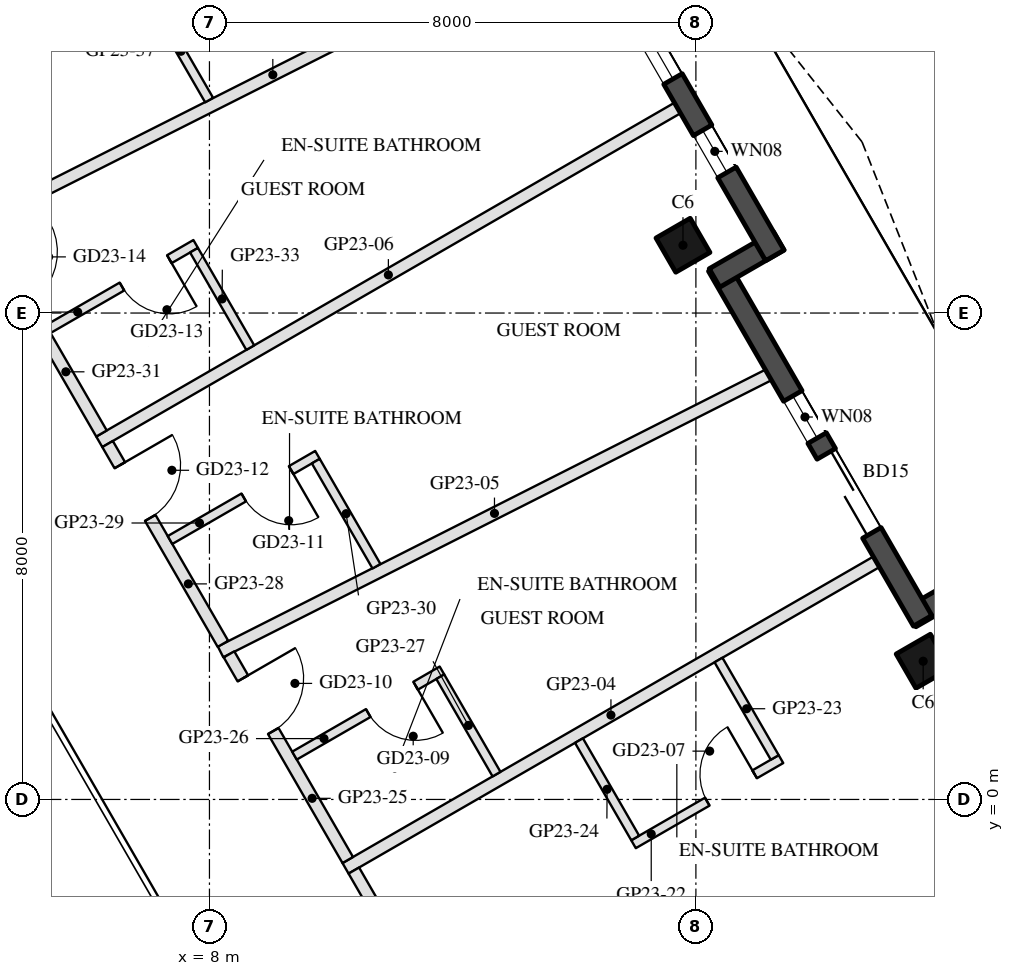
"""IFC4 building model, lengths in metres.
Left out: names, types, materials, properties, quantities, classifications, styles, units other than length and angle.
Written with IfcOpenShell. Run it as: python <this file> out.ifc"""

import sys

from ifc_helpers import new_model, si_unit, direction, frame, frame_2d, origin, origin_2d, place, context, subcontext, project, spatial, rectangle, hollow_rectangle, extrude, element, fill, save


model = new_model("IFC4")
c1 = context("Model", 3, precision=1e-05, world=origin(), true_north=direction((0.0, 1.0)))
c2 = subcontext(c1, "Body", "Model", "MODEL_VIEW")
j1 = project(units=[si_unit("LENGTHUNIT", "METRE"), si_unit("PLANEANGLEUNIT", "RADIAN")], contexts=[c1])
p1 = place(None, origin())
s1 = spatial("IfcSite", under=j1, at=p1, CompositionType="ELEMENT")
p2 = place(p1, origin())
s2 = spatial("IfcBuilding", under=s1, at=p2, CompositionType="ELEMENT")
p3 = place(p2, frame((0.0, 0.0, 246.7)))
s3 = spatial("IfcBuildingStorey", under=s2, at=p3, CompositionType="ELEMENT", Elevation=246.7)
for number, where, z_axis, x_axis in (
    (1, (19.738, 2.273, 0.0), (0.0, 0.0, 1.0), (-0.5, 0.866, 0.0)),
    (2, (15.788, 9.115, 0.0), (0.0, 0.0, 1.0), (-0.5, 0.866, 0.0)),
):
    element("IfcColumn", number, at=place(p3, frame(where, z_axis=z_axis, x_axis=x_axis)), inside=s3, PredefinedType="COLUMN", context=c2, shape_type="SweptSolid", body=[
        extrude(hollow_rectangle(XDim=0.65, YDim=0.65, WallThickness=0.03, at=origin_2d()), origin(), (0.0, 0.0, 1.0), 3.7),
    ])
p4 = place(p3, frame((20.588, 3.601, 0.0), z_axis=(0.0, 0.0, 1.0), x_axis=(-0.866005645448, -0.500034220881, 0.0)))
e3 = element("IfcWall", 3, at=p4, inside=s3, PredefinedType="SOLIDWALL", context=c2, shape_type="SweptSolid", body=[
    extrude(rectangle(XDim=1.22, YDim=0.35, at=frame_2d((0.61, 0.0))), origin(), (0.0, 0.0, 1.0), 3.55),
])
p5 = place(p3, frame((19.729, 2.938, 0.0), z_axis=(0.0, 0.0, 1.0), x_axis=(-0.499976430342, 0.866039011305, 0.0)))
e4 = element("IfcWall", 4, at=p5, inside=s3, PredefinedType="SOLIDWALL", context=c2, shape_type="SweptSolid", body=[
    extrude(rectangle(XDim=6.74, YDim=0.35, at=frame_2d((3.37, 0.0))), origin(), (0.0, 0.0, 1.0), 3.55),
])
p6 = place(p5, frame((1.67, 0.0, 0.0)))
e5 = element("IfcOpeningElement", 5, at=p6, cuts=e4, PredefinedType="OPENING", context=c2, shape_type="SweptSolid", body=[
    extrude(rectangle(XDim=1.5, YDim=2.4, at=frame_2d((0.75, 1.2))), frame((0.0, 0.185, 0.0), z_axis=(0.0, -1.0, 0.0), x_axis=(1.0, 0.0, 0.0)), (0.0, 0.0, 1.0), 0.37),
])
p7 = place(p5, frame((3.47, 0.0, 0.3)))
e6 = element("IfcOpeningElement", 6, at=p7, cuts=e4, PredefinedType="OPENING", context=c2, shape_type="SweptSolid", body=[
    extrude(rectangle(XDim=0.8, YDim=2.65, at=frame_2d((0.4, 1.325))), frame((0.0, 0.185, 0.0), z_axis=(0.0, -1.0, 0.0), x_axis=(1.0, 0.0, 0.0)), (0.0, 0.0, 1.0), 0.37),
])
p8 = place(p3, frame((16.306, 8.577, 0.0), z_axis=(0.0, 0.0, 1.0), x_axis=(0.866092288191, 0.499884134912, 0.0)))
e7 = element("IfcWall", 7, at=p8, inside=s3, PredefinedType="SOLIDWALL", context=c2, shape_type="SweptSolid", body=[
    extrude(rectangle(XDim=1.22, YDim=0.35, at=frame_2d((0.61, 0.0))), origin(), (0.0, 0.0, 1.0), 3.55),
])
p9 = place(p3, frame((17.299, 8.948, 0.0), z_axis=(0.0, 0.0, 1.0), x_axis=(-0.500010041276, 0.866019606374, 0.0)))
e8 = element("IfcWall", 8, at=p9, inside=s3, PredefinedType="SOLIDWALL", context=c2, shape_type="SweptSolid", body=[
    extrude(rectangle(XDim=9.7, YDim=0.35, at=frame_2d((4.85, 0.0))), origin(), (0.0, 0.0, 1.0), 3.55),
])
p10 = place(p9, frame((1.575, 0.0, 0.3)))
e9 = element("IfcOpeningElement", 9, at=p10, cuts=e8, PredefinedType="OPENING", context=c2, shape_type="SweptSolid", body=[
    extrude(rectangle(XDim=0.8, YDim=2.65, at=frame_2d((0.4, 1.325))), frame((0.0, 0.185, 0.0), z_axis=(0.0, -1.0, 0.0), x_axis=(1.0, 0.0, 0.0)), (0.0, 0.0, 1.0), 0.37),
])
p11 = place(p9, frame((3.351, 0.0, 0.3)))
e10 = element("IfcOpeningElement", 10, at=p11, cuts=e8, PredefinedType="OPENING", context=c2, shape_type="SweptSolid", body=[
    extrude(rectangle(XDim=0.8, YDim=2.65, at=frame_2d((0.4, 1.325))), frame((0.0, 0.185, 0.0), z_axis=(0.0, -1.0, 0.0), x_axis=(1.0, 0.0, 0.0)), (0.0, 0.0, 1.0), 0.37),
])
p12 = place(p9, frame((4.949, 0.0, 0.3)))
e11 = element("IfcOpeningElement", 11, at=p12, cuts=e8, PredefinedType="OPENING", context=c2, shape_type="SweptSolid", body=[
    extrude(rectangle(XDim=0.9, YDim=2.65, at=frame_2d((0.45, 1.325))), frame((0.0, 0.185, 0.0), z_axis=(0.0, -1.0, 0.0), x_axis=(1.0, 0.0, 0.0)), (0.0, 0.0, 1.0), 0.37),
])
p13 = place(p9, frame((6.84, 0.0, 0.3)))
e12 = element("IfcOpeningElement", 12, at=p13, cuts=e8, PredefinedType="OPENING", context=c2, shape_type="SweptSolid", body=[
    extrude(rectangle(XDim=1.2, YDim=2.65, at=frame_2d((0.6, 1.325))), frame((0.0, 0.185, 0.0), z_axis=(0.0, -1.0, 0.0), x_axis=(1.0, 0.0, 0.0)), (0.0, 0.0, 1.0), 0.37),
])
p14 = place(p3, frame((18.968, 3.907, 0.0), z_axis=(0.0, 0.0, 1.0), x_axis=(-0.866022637375, -0.500004791531, 0.0)))
e13 = element("IfcWall", 13, at=p14, inside=s3, PredefinedType="PARTITIONING", context=c2, shape_type="SweptSolid", body=[
    extrude(rectangle(XDim=10.08, YDim=0.2, at=frame_2d((5.04, 0.0))), origin(), (0.0, 0.0, 1.0), 3.16),
])
p15 = place(p3, frame((17.192, 6.982, 0.0), z_axis=(0.0, 0.0, 1.0), x_axis=(-0.892469554868, -0.451107629766, 0.0)))
e14 = element("IfcWall", 14, at=p15, inside=s3, PredefinedType="PARTITIONING", context=c2, shape_type="SweptSolid", body=[
    extrude(rectangle(XDim=10.096, YDim=0.2, at=frame_2d((5.048, 0.0))), origin(), (0.0, 0.0, 1.0), 3.16),
])
p16 = place(p3, frame((15.697, 11.372, 0.0), z_axis=(0.0, 0.0, 1.0), x_axis=(-0.866027479907, -0.499996404033, 0.0)))
e15 = element("IfcWall", 15, at=p16, inside=s3, PredefinedType="PARTITIONING", context=c2, shape_type="SweptSolid", body=[
    extrude(rectangle(XDim=10.98, YDim=0.2, at=frame_2d((5.49, 0.0))), origin(), (0.0, 0.0, 1.0), 3.16),
])
p17 = place(p3, frame((13.952, 14.395, 0.0), z_axis=(0.0, 0.0, 1.0), x_axis=(-0.892890171934, -0.450274517226, 0.0)))
e16 = element("IfcWall", 16, at=p17, inside=s3, PredefinedType="PARTITIONING", context=c2, shape_type="SweptSolid", body=[
    extrude(rectangle(XDim=10.998, YDim=0.2, at=frame_2d((5.499, 0.0))), origin(), (0.0, 0.0, 1.0), 3.16),
])
p18 = place(p3, frame((10.375, -1.169, 0.0), z_axis=(0.0, 0.0, 1.0), x_axis=(0.500055316652, -0.865993464345, 0.0)))
e17 = element("IfcWall", 17, at=p18, inside=s3, PredefinedType="PARTITIONING", context=c2, shape_type="SweptSolid", body=[
    extrude(rectangle(XDim=3.788, YDim=0.2, at=frame_2d((1.894, 0.0))), origin(), (0.0, 0.0, 1.0), 2.95),
])
p19 = place(p18, frame((1.394, 0.0, 0.0)))
e18 = element("IfcOpeningElement", 18, at=p19, cuts=e17, PredefinedType="OPENING", context=c2, shape_type="SweptSolid", body=[
    extrude(rectangle(XDim=1.0, YDim=2.1, at=frame_2d((0.5, 1.05))), frame((0.0, 0.11, 0.0), z_axis=(0.0, -1.0, 0.0), x_axis=(1.0, 0.0, 0.0)), (0.0, 0.0, 1.0), 0.22),
])
p20 = place(p3, frame((14.974, -0.737, 0.0), z_axis=(0.0, 0.0, 1.0), x_axis=(0.866018616679, 0.500011755427, 0.0)))
e19 = element("IfcWall", 19, at=p20, inside=s3, PredefinedType="PARTITIONING", context=c2, shape_type="SweptSolid", body=[
    extrude(rectangle(XDim=2.8, YDim=0.15, at=frame_2d((1.4, 0.0))), origin(), (0.0, 0.0, 1.0), 3.55),
])
p21 = place(p20, frame((1.4, 0.0, 0.0)))
e20 = element("IfcOpeningElement", 20, at=p21, cuts=e19, PredefinedType="OPENING", context=c2, shape_type="SweptSolid", body=[
    extrude(rectangle(XDim=0.9, YDim=2.1, at=frame_2d((0.45, 1.05))), frame((0.0, 0.085, 0.0), z_axis=(0.0, -1.0, 0.0), x_axis=(1.0, 0.0, 0.0)), (0.0, 0.0, 1.0), 0.17),
])
p22 = place(p3, frame((17.297, 0.691, 0.0), z_axis=(0.0, 0.0, 1.0), x_axis=(-0.499985172903, 0.866033964044, 0.0)))
e21 = element("IfcWall", 21, at=p22, inside=s3, PredefinedType="PARTITIONING", context=c2, shape_type="SweptSolid", body=[
    extrude(rectangle(XDim=1.85, YDim=0.15, at=frame_2d((0.925, 0.0))), origin(), (0.0, 0.0, 1.0), 2.95),
])
p23 = place(p3, frame((15.002, -0.634, 0.0), z_axis=(0.0, 0.0, 1.0), x_axis=(-0.500042316284, 0.866000971088, 0.0)))
e22 = element("IfcWall", 22, at=p23, inside=s3, PredefinedType="PARTITIONING", context=c2, shape_type="SweptSolid", body=[
    extrude(rectangle(XDim=1.85, YDim=0.15, at=frame_2d((0.925, 0.0))), origin(), (0.0, 0.0, 1.0), 2.95),
])
p24 = place(p3, frame((8.322, 2.386, 0.0), z_axis=(0.0, 0.0, 1.0), x_axis=(0.499998439657, -0.866026304647, 0.0)))
e23 = element("IfcWall", 23, at=p24, inside=s3, PredefinedType="PARTITIONING", context=c2, shape_type="SweptSolid", body=[
    extrude(rectangle(XDim=3.905, YDim=0.2, at=frame_2d((1.953, 0.0))), origin(), (0.0, 0.0, 1.0), 2.95),
])
p25 = place(p24, frame((0.455, 0.0, 0.0)))
e24 = element("IfcOpeningElement", 24, at=p25, cuts=e23, PredefinedType="OPENING", context=c2, shape_type="SweptSolid", body=[
    extrude(rectangle(XDim=1.0, YDim=2.1, at=frame_2d((0.5, 1.05))), frame((0.0, 0.11, 0.0), z_axis=(0.0, -1.0, 0.0), x_axis=(1.0, 0.0, 0.0)), (0.0, 0.0, 1.0), 0.22),
])
p26 = place(p3, frame((11.823, 2.121, 0.0), z_axis=(0.0, 0.0, 1.0), x_axis=(-0.866034573852, -0.49998411664, 0.0)))
e25 = element("IfcWall", 25, at=p26, inside=s3, PredefinedType="PARTITIONING", context=c2, shape_type="SweptSolid", body=[
    extrude(rectangle(XDim=2.8, YDim=0.15, at=frame_2d((1.4, 0.0))), origin(), (0.0, 0.0, 1.0), 2.95),
])
p27 = place(p26, frame((0.5, 0.0, 0.0)))
e26 = element("IfcOpeningElement", 26, at=p27, cuts=e25, PredefinedType="OPENING", context=c2, shape_type="SweptSolid", body=[
    extrude(rectangle(XDim=0.9, YDim=2.1, at=frame_2d((0.45, 1.05))), frame((0.0, 0.085, 0.0), z_axis=(0.0, -1.0, 0.0), x_axis=(1.0, 0.0, 0.0)), (0.0, 0.0, 1.0), 0.17),
])
p28 = place(p3, frame((12.721, 0.416, 0.0), z_axis=(0.0, 0.0, 1.0), x_axis=(-0.499985172903, 0.866033964044, 0.0)))
e27 = element("IfcWall", 27, at=p28, inside=s3, PredefinedType="PARTITIONING", context=c2, shape_type="SweptSolid", body=[
    extrude(rectangle(XDim=1.85, YDim=0.15, at=frame_2d((0.925, 0.0))), origin(), (0.0, 0.0, 1.0), 3.55),
])
p29 = place(p3, frame((6.325, 5.845, 0.0), z_axis=(0.0, 0.0, 1.0), x_axis=(0.499973105789, -0.866040930607, 0.0)))
e28 = element("IfcWall", 28, at=p29, inside=s3, PredefinedType="PARTITIONING", context=c2, shape_type="SweptSolid", body=[
    extrude(rectangle(XDim=3.794, YDim=0.2, at=frame_2d((1.897, 0.0))), origin(), (0.0, 0.0, 1.0), 2.95),
])
p30 = place(p29, frame((0.403, 0.0, 0.0)))
e29 = element("IfcOpeningElement", 29, at=p30, cuts=e28, PredefinedType="OPENING", context=c2, shape_type="SweptSolid", body=[
    extrude(rectangle(XDim=1.0, YDim=2.1, at=frame_2d((0.5, 1.05))), frame((0.0, 0.11, 0.0), z_axis=(0.0, -1.0, 0.0), x_axis=(1.0, 0.0, 0.0)), (0.0, 0.0, 1.0), 0.22),
])
p31 = place(p3, frame((9.776, 5.667, 0.0), z_axis=(0.0, 0.0, 1.0), x_axis=(-0.866034573852, -0.49998411664, 0.0)))
e30 = element("IfcWall", 30, at=p31, inside=s3, PredefinedType="PARTITIONING", context=c2, shape_type="SweptSolid", body=[
    extrude(rectangle(XDim=2.8, YDim=0.15, at=frame_2d((1.4, 0.0))), origin(), (0.0, 0.0, 1.0), 2.95),
])
p32 = place(p31, frame((0.5, 0.0, 0.0)))
e31 = element("IfcOpeningElement", 31, at=p32, cuts=e30, PredefinedType="OPENING", context=c2, shape_type="SweptSolid", body=[
    extrude(rectangle(XDim=0.9, YDim=2.1, at=frame_2d((0.45, 1.05))), frame((0.0, 0.085, 0.0), z_axis=(0.0, -1.0, 0.0), x_axis=(1.0, 0.0, 0.0)), (0.0, 0.0, 1.0), 0.17),
])
p33 = place(p3, frame((10.747, 3.836, 0.0), z_axis=(0.0, 0.0, 1.0), x_axis=(-0.499980071345, 0.866036909293, 0.0)))
e32 = element("IfcWall", 32, at=p33, inside=s3, PredefinedType="PARTITIONING", context=c2, shape_type="SweptSolid", body=[
    extrude(rectangle(XDim=1.996, YDim=0.15, at=frame_2d((0.998, 0.0))), origin(), (0.0, 0.0, 1.0), 2.95),
])
p34 = place(p3, frame((4.272, 9.401, 0.0), z_axis=(0.0, 0.0, 1.0), x_axis=(0.499998439657, -0.866026304647, 0.0)))
e33 = element("IfcWall", 33, at=p34, inside=s3, PredefinedType="PARTITIONING", context=c2, shape_type="SweptSolid", body=[
    extrude(rectangle(XDim=3.905, YDim=0.2, at=frame_2d((1.953, 0.0))), origin(), (0.0, 0.0, 1.0), 2.95),
])
p35 = place(p34, frame((0.456, 0.0, 0.0)))
e34 = element("IfcOpeningElement", 34, at=p35, cuts=e33, PredefinedType="OPENING", context=c2, shape_type="SweptSolid", body=[
    extrude(rectangle(XDim=1.0, YDim=2.1, at=frame_2d((0.5, 1.05))), frame((0.0, 0.11, 0.0), z_axis=(0.0, -1.0, 0.0), x_axis=(1.0, 0.0, 0.0)), (0.0, 0.0, 1.0), 0.22),
])
p36 = place(p3, frame((7.774, 9.136, 0.0), z_axis=(0.0, 0.0, 1.0), x_axis=(-0.866056369097, -0.49994636267, 0.0)))
e35 = element("IfcWall", 35, at=p36, inside=s3, PredefinedType="PARTITIONING", context=c2, shape_type="SweptSolid", body=[
    extrude(rectangle(XDim=2.8, YDim=0.15, at=frame_2d((1.4, 0.0))), origin(), (0.0, 0.0, 1.0), 2.95),
])
p37 = place(p36, frame((0.5, 0.0, 0.0)))
e36 = element("IfcOpeningElement", 36, at=p37, cuts=e35, PredefinedType="OPENING", context=c2, shape_type="SweptSolid", body=[
    extrude(rectangle(XDim=0.9, YDim=2.1, at=frame_2d((0.45, 1.05))), frame((0.0, 0.085, 0.0), z_axis=(0.0, -1.0, 0.0), x_axis=(1.0, 0.0, 0.0)), (0.0, 0.0, 1.0), 0.17),
])
p38 = place(p3, frame((8.671, 7.431, 0.0), z_axis=(0.0, 0.0, 1.0), x_axis=(-0.500042316284, 0.866000971088, 0.0)))
e37 = element("IfcWall", 37, at=p38, inside=s3, PredefinedType="PARTITIONING", context=c2, shape_type="SweptSolid", body=[
    extrude(rectangle(XDim=1.85, YDim=0.15, at=frame_2d((0.925, 0.0))), origin(), (0.0, 0.0, 1.0), 2.95),
])
p39 = place(p3, frame((7.995, 11.502, 0.0), z_axis=(0.0, 0.0, 1.0), x_axis=(-0.4999770169, 0.866038672677, 0.0)))
e38 = element("IfcWall", 38, at=p39, inside=s3, PredefinedType="PARTITIONING", context=c2, shape_type="SweptSolid", body=[
    extrude(rectangle(XDim=1.854, YDim=0.15, at=frame_2d((0.927, 0.0))), origin(), (0.0, 0.0, 1.0), 2.95),
])
p40 = place(p6, frame((1.5, 0.0, 0.0), z_axis=(0.0, 0.0, 1.0), x_axis=(-1.0, 0.0, 0.0)))
e39 = element("IfcDoor", 39, at=p40, inside=s3, OperationType="SLIDING_TO_LEFT", PredefinedType="DOOR", context=c2, shape_type="SweptSolid", body=[
    extrude(rectangle(XDim=1.5, YDim=2.4, at=frame_2d((0.75, 1.2))), frame((0.0, 0.025, 0.0), z_axis=(0.0, -1.0, 0.0), x_axis=(1.0, 0.0, 0.0)), (0.0, 0.0, 1.0), 0.05),
])
fill(e5, e39)
p41 = place(p7, origin())
e40 = element("IfcWindow", 40, at=p41, inside=s3, PartitioningType="SINGLE_PANEL", PredefinedType="WINDOW", context=c2, shape_type="SweptSolid", body=[
    extrude(rectangle(XDim=0.8, YDim=2.65, at=frame_2d((0.4, 1.325))), frame((0.0, 0.03, 0.0), z_axis=(0.0, -1.0, 0.0), x_axis=(1.0, 0.0, 0.0)), (0.0, 0.0, 1.0), 0.06),
])
fill(e6, e40)
p42 = place(p10, origin())
e41 = element("IfcWindow", 41, at=p42, inside=s3, PartitioningType="SINGLE_PANEL", PredefinedType="WINDOW", context=c2, shape_type="SweptSolid", body=[
    extrude(rectangle(XDim=0.8, YDim=2.65, at=frame_2d((0.4, 1.325))), frame((0.0, 0.03, 0.0), z_axis=(0.0, -1.0, 0.0), x_axis=(1.0, 0.0, 0.0)), (0.0, 0.0, 1.0), 0.06),
])
fill(e9, e41)
p43 = place(p11, origin())
e42 = element("IfcWindow", 42, at=p43, inside=s3, PartitioningType="SINGLE_PANEL", PredefinedType="WINDOW", context=c2, shape_type="SweptSolid", body=[
    extrude(rectangle(XDim=0.8, YDim=2.65, at=frame_2d((0.4, 1.325))), frame((0.0, 0.03, 0.0), z_axis=(0.0, -1.0, 0.0), x_axis=(1.0, 0.0, 0.0)), (0.0, 0.0, 1.0), 0.06),
])
fill(e10, e42)
p44 = place(p21, origin())
e43 = element("IfcDoor", 43, at=p44, inside=s3, OperationType="SINGLE_SWING_RIGHT", PredefinedType="DOOR", context=c2, shape_type="SweptSolid", body=[
    extrude(rectangle(XDim=0.9, YDim=2.1, at=frame_2d((0.45, 1.05))), frame((0.0, 0.025, 0.0), z_axis=(0.0, -1.0, 0.0), x_axis=(1.0, 0.0, 0.0)), (0.0, 0.0, 1.0), 0.05),
])
fill(e20, e43)
p45 = place(p27, origin())
e44 = element("IfcDoor", 44, at=p45, inside=s3, OperationType="SINGLE_SWING_LEFT", PredefinedType="DOOR", context=c2, shape_type="SweptSolid", body=[
    extrude(rectangle(XDim=0.9, YDim=2.1, at=frame_2d((0.45, 1.05))), frame((0.0, 0.025, 0.0), z_axis=(0.0, -1.0, 0.0), x_axis=(1.0, 0.0, 0.0)), (0.0, 0.0, 1.0), 0.05),
])
fill(e26, e44)
p46 = place(p25, origin())
e45 = element("IfcDoor", 45, at=p46, inside=s3, OperationType="SINGLE_SWING_LEFT", PredefinedType="DOOR", context=c2, shape_type="SweptSolid", body=[
    extrude(rectangle(XDim=1.0, YDim=2.1, at=frame_2d((0.5, 1.05))), frame((0.0, 0.025, 0.0), z_axis=(0.0, -1.0, 0.0), x_axis=(1.0, 0.0, 0.0)), (0.0, 0.0, 1.0), 0.05),
])
fill(e24, e45)
p47 = place(p32, origin())
e46 = element("IfcDoor", 46, at=p47, inside=s3, OperationType="SINGLE_SWING_LEFT", PredefinedType="DOOR", context=c2, shape_type="SweptSolid", body=[
    extrude(rectangle(XDim=0.9, YDim=2.1, at=frame_2d((0.45, 1.05))), frame((0.0, 0.025, 0.0), z_axis=(0.0, -1.0, 0.0), x_axis=(1.0, 0.0, 0.0)), (0.0, 0.0, 1.0), 0.05),
])
fill(e31, e46)
p48 = place(p30, origin())
e47 = element("IfcDoor", 47, at=p48, inside=s3, OperationType="SINGLE_SWING_LEFT", PredefinedType="DOOR", context=c2, shape_type="SweptSolid", body=[
    extrude(rectangle(XDim=1.0, YDim=2.1, at=frame_2d((0.5, 1.05))), frame((0.0, 0.025, 0.0), z_axis=(0.0, -1.0, 0.0), x_axis=(1.0, 0.0, 0.0)), (0.0, 0.0, 1.0), 0.05),
])
fill(e29, e47)
p49 = place(p37, origin())
e48 = element("IfcDoor", 48, at=p49, inside=s3, OperationType="SINGLE_SWING_LEFT", PredefinedType="DOOR", context=c2, shape_type="SweptSolid", body=[
    extrude(rectangle(XDim=0.9, YDim=2.1, at=frame_2d((0.45, 1.05))), frame((0.0, 0.025, 0.0), z_axis=(0.0, -1.0, 0.0), x_axis=(1.0, 0.0, 0.0)), (0.0, 0.0, 1.0), 0.05),
])
fill(e36, e48)
save(model, sys.argv[1])
